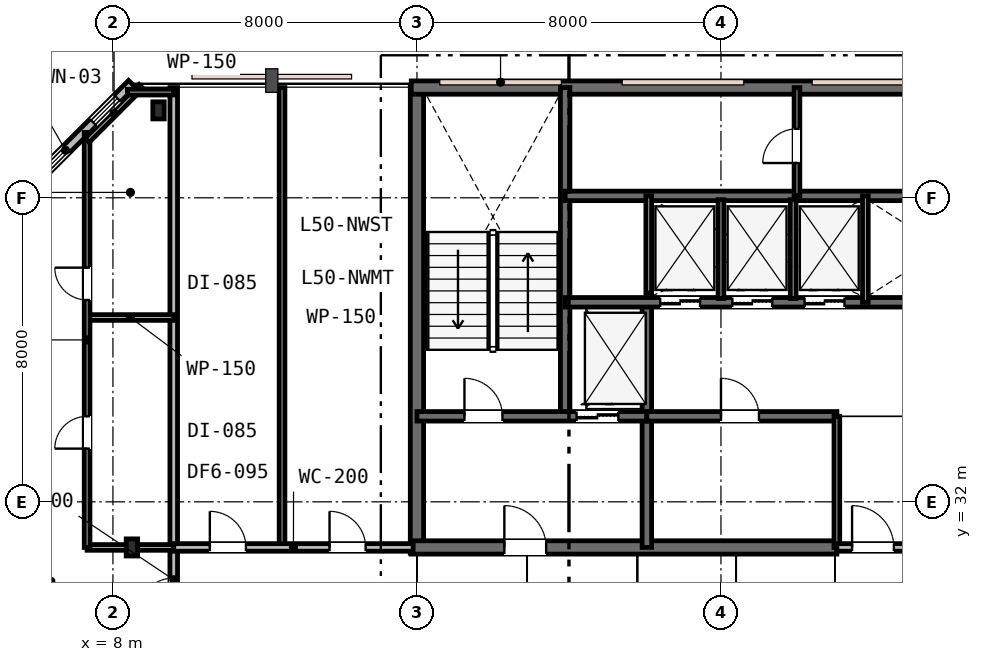
"""IFC4 building model, lengths in metres.
Left out: names, types, materials, properties, quantities, classifications, styles, units other than length and angle.
Written with IfcOpenShell. Run it as: python <this file> out.ifc"""

import sys

from ifc_helpers import new_model, si_unit, direction, frame, frame_2d, origin, origin_2d, place, context, subcontext, project, spatial, rectangle, i_section, extrude, element, fill, save


model = new_model("IFC4")
c1 = context("Model", 3, precision=1e-05, world=origin(), true_north=direction((0.0, 1.0)))
c2 = subcontext(c1, "Body", "Model", "MODEL_VIEW")
j1 = project(units=[si_unit("LENGTHUNIT", "METRE"), si_unit("PLANEANGLEUNIT", "RADIAN")], contexts=[c1])
p1 = place(None, origin())
s1 = spatial("IfcSite", under=j1, at=p1, CompositionType="ELEMENT")
p2 = place(p1, origin())
s2 = spatial("IfcBuilding", under=s1, at=p2, CompositionType="ELEMENT")
p3 = place(p2, frame((0.0, 0.0, 193.8)))
s3 = spatial("IfcBuildingStorey", under=s2, at=p3, CompositionType="ELEMENT", Elevation=193.8)
p4 = place(p3, frame((16.0, 30.65, 0.0), z_axis=(0.0, 0.0, 1.0), x_axis=(0.0, 1.0, 0.0)))
e1 = element("IfcWall", 1, at=p4, inside=s3, PredefinedType="SHEAR", context=c2, shape_type="SweptSolid", body=[
    extrude(rectangle(XDim=12.3, YDim=0.35, at=frame_2d((6.15, 0.0))), origin(), (0.0, 0.0, 1.0), 3.6),
])
p5 = place(p3, frame((15.85, 42.9, 0.0), z_axis=(0.0, 0.0, 1.0), x_axis=(1.0, 0.0, 0.0)))
e2 = element("IfcWall", 2, at=p5, inside=s3, PredefinedType="SHEAR", context=c2, shape_type="SweptSolid", body=[
    extrude(rectangle(XDim=24.3, YDim=0.35, at=frame_2d((12.15, 0.0))), origin(), (0.0, 0.0, 1.0), 3.6),
])
p6 = place(p3, frame((15.85, 30.8, 0.0), z_axis=(0.0, 0.0, 1.0), x_axis=(1.0, 0.0, 0.0)))
e3 = element("IfcWall", 3, at=p6, inside=s3, PredefinedType="SHEAR", context=c2, shape_type="SweptSolid", body=[
    extrude(rectangle(XDim=11.2, YDim=0.35, at=frame_2d((5.6, 0.0))), origin(), (0.0, 0.0, 1.0), 3.6),
])
p7 = place(p6, frame((2.45, 0.0, 0.0)))
e4 = element("IfcOpeningElement", 4, at=p7, cuts=e3, PredefinedType="OPENING", context=c2, shape_type="SweptSolid", body=[
    extrude(rectangle(XDim=1.1, YDim=2.15, at=frame_2d((0.55, 1.075))), frame((0.0, 0.185, 0.0), z_axis=(0.0, -1.0, 0.0), x_axis=(1.0, 0.0, 0.0)), (0.0, 0.0, 1.0), 0.37),
])
p8 = place(p3, frame((19.9, 34.25, 0.0), z_axis=(0.0, 0.0, 1.0), x_axis=(0.0, 1.0, 0.0)))
e5 = element("IfcWall", 5, at=p8, inside=s3, PredefinedType="SHEAR", context=c2, shape_type="SweptSolid", body=[
    extrude(rectangle(XDim=8.65, YDim=0.25, at=frame_2d((4.325, 0.0))), origin(), (0.0, 0.0, 1.0), 3.6),
])
p9 = place(p3, frame((22.05, 30.8, 0.0), z_axis=(0.0, 0.0, 1.0), x_axis=(0.0, 1.0, 0.0)))
e6 = element("IfcWall", 6, at=p9, inside=s3, PredefinedType="SHEAR", context=c2, shape_type="SweptSolid", body=[
    extrude(rectangle(XDim=6.45, YDim=0.25, at=frame_2d((3.225, 0.0))), origin(), (0.0, 0.0, 1.0), 3.6),
])
p10 = place(p3, frame((16.0, 34.25, 0.0), z_axis=(0.0, 0.0, 1.0), x_axis=(1.0, 0.0, 0.0)))
e7 = element("IfcWall", 7, at=p10, inside=s3, PredefinedType="SHEAR", context=c2, shape_type="SweptSolid", body=[
    extrude(rectangle(XDim=6.05, YDim=0.25, at=frame_2d((3.025, 0.0))), origin(), (0.0, 0.0, 1.0), 3.6),
])
p11 = place(p10, frame((1.25, 0.0, 0.0)))
e8 = element("IfcOpeningElement", 8, at=p11, cuts=e7, PredefinedType="OPENING", context=c2, shape_type="SweptSolid", body=[
    extrude(rectangle(XDim=1.0, YDim=2.15, at=frame_2d((0.5, 1.075))), frame((0.0, 0.135, 0.0), z_axis=(0.0, -1.0, 0.0), x_axis=(1.0, 0.0, 0.0)), (0.0, 0.0, 1.0), 0.27),
])
p12 = place(p10, frame((4.2, 0.0, 0.0)))
e9 = element("IfcOpeningElement", 9, at=p12, cuts=e7, PredefinedType="OPENING", context=c2, shape_type="SweptSolid", body=[
    extrude(rectangle(XDim=1.1, YDim=2.15, at=frame_2d((0.55, 1.075))), frame((0.0, 0.135, 0.0), z_axis=(0.0, -1.0, 0.0), x_axis=(1.0, 0.0, 0.0)), (0.0, 0.0, 1.0), 0.27),
])
p13 = place(p3, frame((22.05, 34.25, 0.0), z_axis=(0.0, 0.0, 1.0), x_axis=(1.0, 0.0, 0.0)))
e10 = element("IfcWall", 10, at=p13, inside=s3, PredefinedType="SHEAR", context=c2, shape_type="SweptSolid", body=[
    extrude(rectangle(XDim=5.0, YDim=0.25, at=frame_2d((2.5, 0.0))), origin(), (0.0, 0.0, 1.0), 3.6),
])
p14 = place(p13, frame((1.95, 0.0, 0.0)))
e11 = element("IfcOpeningElement", 11, at=p14, cuts=e10, PredefinedType="OPENING", context=c2, shape_type="SweptSolid", body=[
    extrude(rectangle(XDim=1.0, YDim=2.15, at=frame_2d((0.5, 1.075))), frame((0.0, 0.135, 0.0), z_axis=(0.0, -1.0, 0.0), x_axis=(1.0, 0.0, 0.0)), (0.0, 0.0, 1.0), 0.27),
])
p15 = place(p3, frame((19.9, 37.25, 0.0), z_axis=(0.0, 0.0, 1.0), x_axis=(1.0, 0.0, 0.0)))
e12 = element("IfcWall", 12, at=p15, inside=s3, PredefinedType="SHEAR", context=c2, shape_type="SweptSolid", body=[
    extrude(rectangle(XDim=16.2, YDim=0.25, at=frame_2d((8.1, 0.0))), origin(), (0.0, 0.0, 1.0), 3.6),
])
p16 = place(p15, frame((12.55, 0.0, 0.0)))
e13 = element("IfcOpeningElement", 13, at=p16, cuts=e12, PredefinedType="OPENING", context=c2, shape_type="SweptSolid", body=[
    extrude(rectangle(XDim=0.9, YDim=2.15, at=frame_2d((0.45, 1.075))), frame((0.0, 0.135, 0.0), z_axis=(0.0, -1.0, 0.0), x_axis=(1.0, 0.0, 0.0)), (0.0, 0.0, 1.0), 0.27),
])
p17 = place(p15, frame((2.5, 0.0, 0.0)))
e14 = element("IfcOpeningElement", 14, at=p17, cuts=e12, PredefinedType="OPENING", context=c2, shape_type="SweptSolid", body=[
    extrude(rectangle(XDim=1.05, YDim=2.15, at=frame_2d((0.525, 1.075))), frame((0.0, 0.135, 0.0), z_axis=(0.0, -1.0, 0.0), x_axis=(1.0, 0.0, 0.0)), (0.0, 0.0, 1.0), 0.27),
])
p18 = place(p15, frame((4.4, 0.0, 0.0)))
e15 = element("IfcOpeningElement", 15, at=p18, cuts=e12, PredefinedType="OPENING", context=c2, shape_type="SweptSolid", body=[
    extrude(rectangle(XDim=1.05, YDim=2.15, at=frame_2d((0.525, 1.075))), frame((0.0, 0.135, 0.0), z_axis=(0.0, -1.0, 0.0), x_axis=(1.0, 0.0, 0.0)), (0.0, 0.0, 1.0), 0.27),
])
p19 = place(p15, frame((6.3, 0.0, 0.0)))
e16 = element("IfcOpeningElement", 16, at=p19, cuts=e12, PredefinedType="OPENING", context=c2, shape_type="SweptSolid", body=[
    extrude(rectangle(XDim=1.05, YDim=2.15, at=frame_2d((0.525, 1.075))), frame((0.0, 0.135, 0.0), z_axis=(0.0, -1.0, 0.0), x_axis=(1.0, 0.0, 0.0)), (0.0, 0.0, 1.0), 0.27),
])
p20 = place(p3, frame((19.9, 40.05, 0.0), z_axis=(0.0, 0.0, 1.0), x_axis=(1.0, 0.0, 0.0)))
e17 = element("IfcWall", 17, at=p20, inside=s3, PredefinedType="SHEAR", context=c2, shape_type="SweptSolid", body=[
    extrude(rectangle(XDim=12.05, YDim=0.25, at=frame_2d((6.025, 0.0))), origin(), (0.0, 0.0, 1.0), 3.6),
])
for number, where, z_axis, x_axis in (
    (18, (8.5, 30.8, 0.0), (0.0, 0.0, 1.0), (1.0, 0.0, 0.0)),
    (19, (9.2, 42.3, 0.0), (0.0, 0.0, 1.0), (1.0, 0.0, 0.0)),
):
    element("IfcColumn", number, at=place(p3, frame(where, z_axis=z_axis, x_axis=x_axis)), inside=s3, PredefinedType="COLUMN", context=c2, shape_type="SweptSolid", body=[
        extrude(i_section(OverallWidth=0.3, OverallDepth=0.45, WebThickness=0.014, FlangeThickness=0.026, FilletRadius=0.027, at=origin_2d()), origin(), (0.0, 0.0, 1.0), 3.6),
    ])
p21 = place(p3, frame((8.5, 43.0, 0.0), z_axis=(0.0, 0.0, 1.0), x_axis=(-0.707106781187, -0.707106781187, 0.0)))
e20 = element("IfcWall", 20, at=p21, inside=s3, PredefinedType="STANDARD", context=c2, shape_type="SweptSolid", body=[
    extrude(rectangle(XDim=4.95, YDim=0.25, at=frame_2d((2.475, 0.0))), origin(), (0.0, 0.0, 1.0), 3.33),
])
p22 = place(p21, frame((0.54, 0.0, 0.9)))
e21 = element("IfcOpeningElement", 21, at=p22, cuts=e20, PredefinedType="OPENING", context=c2, shape_type="SweptSolid", body=[
    extrude(rectangle(XDim=0.9, YDim=1.55, at=frame_2d((0.45, 0.775))), frame((0.0, 0.135, 0.0), z_axis=(0.0, -1.0, 0.0), x_axis=(1.0, 0.0, 0.0)), (0.0, 0.0, 1.0), 0.27),
])
p23 = place(p21, frame((2.435, 0.0, 0.75)))
e22 = element("IfcOpeningElement", 22, at=p23, cuts=e20, PredefinedType="OPENING", context=c2, shape_type="SweptSolid", body=[
    extrude(rectangle(XDim=1.8, YDim=1.85, at=frame_2d((0.9, 0.925))), frame((0.0, 0.135, 0.0), z_axis=(0.0, -1.0, 0.0), x_axis=(1.0, 0.0, 0.0)), (0.0, 0.0, 1.0), 0.27),
])
p24 = place(p3, frame((27.05, 30.8, 0.0), z_axis=(0.0, 0.0, 1.0), x_axis=(0.0, 1.0, 0.0)))
e23 = element("IfcWall", 23, at=p24, inside=s3, PredefinedType="PLUMBINGWALL", context=c2, shape_type="SweptSolid", body=[
    extrude(rectangle(XDim=3.45, YDim=0.15, at=frame_2d((1.725, 0.0))), origin(), (0.0, 0.0, 1.0), 3.07),
])
p25 = place(p3, frame((27.05, 30.8, 0.0), z_axis=(0.0, 0.0, 1.0), x_axis=(1.0, 0.0, 0.0)))
e24 = element("IfcWall", 24, at=p25, inside=s3, PredefinedType="PARTITIONING", context=c2, shape_type="SweptSolid", body=[
    extrude(rectangle(XDim=1.9, YDim=0.2, at=frame_2d((0.95, 0.0))), origin(), (0.0, 0.0, 1.0), 3.07),
])
p26 = place(p25, frame((0.4, 0.0, 0.0)))
e25 = element("IfcOpeningElement", 25, at=p26, cuts=e24, PredefinedType="OPENING", context=c2, shape_type="SweptSolid", body=[
    extrude(rectangle(XDim=1.1, YDim=2.15, at=frame_2d((0.55, 1.075))), frame((0.0, 0.11, 0.0), z_axis=(0.0, -1.0, 0.0), x_axis=(1.0, 0.0, 0.0)), (0.0, 0.0, 1.0), 0.22),
])
p27 = place(p3, frame((22.1, 37.49, 0.0), z_axis=(0.0, 0.0, 1.0), x_axis=(0.0, 1.0, 0.0)))
e26 = element("IfcWall", 26, at=p27, inside=s3, PredefinedType="PLUMBINGWALL", context=c2, shape_type="SweptSolid", body=[
    extrude(rectangle(XDim=2.56, YDim=0.15, at=frame_2d((1.28, 0.0))), origin(), (0.0, 0.0, 1.0), 3.33),
])
p28 = place(p3, frame((27.8, 37.25, 0.0), z_axis=(0.0, 0.0, 1.0), x_axis=(0.0, 1.0, 0.0)))
e27 = element("IfcWall", 27, at=p28, inside=s3, PredefinedType="PLUMBINGWALL", context=c2, shape_type="SweptSolid", body=[
    extrude(rectangle(XDim=2.8, YDim=0.15, at=frame_2d((1.4, 0.0))), origin(), (0.0, 0.0, 1.0), 3.33),
])
for number, where, z_axis, x_axis in (
    (28, (24.0, 37.35, 0.0), (0.0, 0.0, 1.0), (0.0, 1.0, 0.0)),
    (29, (25.9, 37.35, 0.0), (0.0, 0.0, 1.0), (0.0, 1.0, 0.0)),
):
    element("IfcWall", number, at=place(p3, frame(where, z_axis=z_axis, x_axis=x_axis)), inside=s3, PredefinedType="PLUMBINGWALL", context=c2, shape_type="SweptSolid", body=[
        extrude(rectangle(XDim=2.6, YDim=0.15, at=frame_2d((1.3, 0.0))), origin(), (0.0, 0.0, 1.0), 3.33),
    ])
p29 = place(p3, frame((26.0, 40.05, 0.0), z_axis=(0.0, 0.0, 1.0), x_axis=(0.0, 1.0, 0.0)))
e30 = element("IfcWall", 30, at=p29, inside=s3, PredefinedType="PARTITIONING", context=c2, shape_type="SweptSolid", body=[
    extrude(rectangle(XDim=2.85, YDim=0.15, at=frame_2d((1.425, 0.0))), origin(), (0.0, 0.0, 1.0), 3.33),
])
p30 = place(p29, frame((0.865, 0.0, 0.0)))
e31 = element("IfcOpeningElement", 31, at=p30, cuts=e30, PredefinedType="OPENING", context=c2, shape_type="SweptSolid", body=[
    extrude(rectangle(XDim=0.9, YDim=2.15, at=frame_2d((0.45, 1.075))), frame((0.0, 0.085, 0.0), z_axis=(0.0, -1.0, 0.0), x_axis=(1.0, 0.0, 0.0)), (0.0, 0.0, 1.0), 0.17),
])
p31 = place(p3, frame((9.6, 17.0, 0.0), z_axis=(0.0, 0.0, 1.0), x_axis=(0.0, 1.0, 0.0)))
e32 = element("IfcWall", 32, at=p31, inside=s3, PredefinedType="PARTITIONING", context=c2, shape_type="SweptSolid", body=[
    extrude(rectangle(XDim=25.9, YDim=0.2, at=frame_2d((12.95, 0.0))), origin(), (0.0, 0.0, 1.0), 2.92),
])
p32 = place(p31, frame((12.045, 0.0, 0.0)))
e33 = element("IfcOpeningElement", 33, at=p32, cuts=e32, PredefinedType="OPENING", context=c2, shape_type="SweptSolid", body=[
    extrude(rectangle(XDim=0.95, YDim=2.15, at=frame_2d((0.475, 1.075))), frame((0.0, 0.11, 0.0), z_axis=(0.0, -1.0, 0.0), x_axis=(1.0, 0.0, 0.0)), (0.0, 0.0, 1.0), 0.22),
])
p33 = place(p31, frame((3.125, 0.0, 0.0)))
e34 = element("IfcOpeningElement", 34, at=p33, cuts=e32, PredefinedType="OPENING", context=c2, shape_type="SweptSolid", body=[
    extrude(rectangle(XDim=0.95, YDim=2.15, at=frame_2d((0.475, 1.075))), frame((0.0, 0.11, 0.0), z_axis=(0.0, -1.0, 0.0), x_axis=(1.0, 0.0, 0.0)), (0.0, 0.0, 1.0), 0.22),
])
p34 = place(p3, frame((7.32, 30.8, 0.0), z_axis=(0.0, 0.0, 1.0), x_axis=(1.0, 0.0, 0.0)))
e35 = element("IfcWall", 35, at=p34, inside=s3, PredefinedType="PARTITIONING", context=c2, shape_type="SweptSolid", body=[
    extrude(rectangle(XDim=2.28, YDim=0.15, at=frame_2d((1.14, 0.0))), origin(), (0.0, 0.0, 1.0), 2.92),
])
p35 = place(p3, frame((7.32, 36.85, 0.0), z_axis=(0.0, 0.0, 1.0), x_axis=(1.0, 0.0, 0.0)))
e36 = element("IfcWall", 36, at=p35, inside=s3, PredefinedType="PARTITIONING", context=c2, shape_type="SweptSolid", body=[
    extrude(rectangle(XDim=2.28, YDim=0.15, at=frame_2d((1.14, 0.0))), origin(), (0.0, 0.0, 1.0), 3.33),
])
p36 = place(p3, frame((7.32, 30.8, 0.0), z_axis=(0.0, 0.0, 1.0), x_axis=(0.0, 1.0, 0.0)))
e37 = element("IfcWall", 37, at=p36, inside=s3, PredefinedType="PARTITIONING", context=c2, shape_type="SweptSolid", body=[
    extrude(rectangle(XDim=10.92, YDim=0.15, at=frame_2d((5.46, 0.0))), origin(), (0.0, 0.0, 1.0), 2.92),
])
p37 = place(p36, frame((2.6, 0.0, 0.0)))
e38 = element("IfcOpeningElement", 38, at=p37, cuts=e37, PredefinedType="OPENING", context=c2, shape_type="SweptSolid", body=[
    extrude(rectangle(XDim=0.85, YDim=2.15, at=frame_2d((0.425, 1.075))), frame((0.0, 0.085, 0.0), z_axis=(0.0, -1.0, 0.0), x_axis=(1.0, 0.0, 0.0)), (0.0, 0.0, 1.0), 0.17),
])
p38 = place(p36, frame((6.512, 0.0, 0.0)))
e39 = element("IfcOpeningElement", 39, at=p38, cuts=e37, PredefinedType="OPENING", context=c2, shape_type="SweptSolid", body=[
    extrude(rectangle(XDim=0.85, YDim=2.15, at=frame_2d((0.425, 1.075))), frame((0.0, 0.085, 0.0), z_axis=(0.0, -1.0, 0.0), x_axis=(1.0, 0.0, 0.0)), (0.0, 0.0, 1.0), 0.17),
])
p39 = place(p3, frame((7.32, 41.509, 0.0), z_axis=(0.0, 0.0, 1.0), x_axis=(0.707106781187, 0.707106781187, 0.0)))
e40 = element("IfcWall", 40, at=p39, inside=s3, PredefinedType="PARTITIONING", context=c2, shape_type="SweptSolid", body=[
    extrude(rectangle(XDim=2.009, YDim=0.15, at=frame_2d((1.004, 0.0))), origin(), (0.0, 0.0, 1.0), 3.33),
])
p40 = place(p3, frame((8.38, 42.78, 0.0), z_axis=(0.0, 0.0, 1.0), x_axis=(1.0, 0.0, 0.0)))
e41 = element("IfcWall", 41, at=p40, inside=s3, PredefinedType="PARTITIONING", context=c2, shape_type="SweptSolid", body=[
    extrude(rectangle(XDim=1.22, YDim=0.15, at=frame_2d((0.61, 0.0))), origin(), (0.0, 0.0, 1.0), 3.02),
])
p41 = place(p3, frame((12.45, 30.8, 0.0), z_axis=(0.0, 0.0, 1.0), x_axis=(0.0, 1.0, 0.0)))
e42 = element("IfcWall", 42, at=p41, inside=s3, PredefinedType="PARTITIONING", context=c2, shape_type="SweptSolid", body=[
    extrude(rectangle(XDim=12.1, YDim=0.15, at=frame_2d((6.05, 0.0))), origin(), (0.0, 0.0, 1.0), 2.92),
])
p42 = place(p3, frame((9.6, 30.8, 0.0), z_axis=(0.0, 0.0, 1.0), x_axis=(1.0, 0.0, 0.0)))
e43 = element("IfcWall", 43, at=p42, inside=s3, PredefinedType="PARTITIONING", context=c2, shape_type="SweptSolid", body=[
    extrude(rectangle(XDim=6.3, YDim=0.2, at=frame_2d((3.15, 0.0))), origin(), (0.0, 0.0, 1.0), 2.92),
])
p43 = place(p42, frame((0.95, 0.0, 0.0)))
e44 = element("IfcOpeningElement", 44, at=p43, cuts=e43, PredefinedType="OPENING", context=c2, shape_type="SweptSolid", body=[
    extrude(rectangle(XDim=0.95, YDim=2.15, at=frame_2d((0.475, 1.075))), frame((0.0, 0.11, 0.0), z_axis=(0.0, -1.0, 0.0), x_axis=(1.0, 0.0, 0.0)), (0.0, 0.0, 1.0), 0.22),
])
p44 = place(p42, frame((4.1, 0.0, 0.0)))
e45 = element("IfcOpeningElement", 45, at=p44, cuts=e43, PredefinedType="OPENING", context=c2, shape_type="SweptSolid", body=[
    extrude(rectangle(XDim=0.95, YDim=2.15, at=frame_2d((0.475, 1.075))), frame((0.0, 0.11, 0.0), z_axis=(0.0, -1.0, 0.0), x_axis=(1.0, 0.0, 0.0)), (0.0, 0.0, 1.0), 0.22),
])
p45 = place(p22, origin())
e46 = element("IfcWindow", 46, at=p45, inside=s3, PartitioningType="SINGLE_PANEL", PredefinedType="WINDOW", context=c2, shape_type="SweptSolid", body=[
    extrude(rectangle(XDim=0.9, YDim=1.55, at=frame_2d((0.45, 0.775))), frame((0.0, 0.03, 0.0), z_axis=(0.0, -1.0, 0.0), x_axis=(1.0, 0.0, 0.0)), (0.0, 0.0, 1.0), 0.06),
])
fill(e21, e46)
p46 = place(p23, origin())
e47 = element("IfcWindow", 47, at=p46, inside=s3, PartitioningType="SINGLE_PANEL", PredefinedType="WINDOW", context=c2, shape_type="SweptSolid", body=[
    extrude(rectangle(XDim=1.8, YDim=1.85, at=frame_2d((0.9, 0.925))), frame((0.0, 0.03, 0.0), z_axis=(0.0, -1.0, 0.0), x_axis=(1.0, 0.0, 0.0)), (0.0, 0.0, 1.0), 0.06),
])
fill(e22, e47)
p47 = place(p26, origin())
e48 = element("IfcDoor", 48, at=p47, inside=s3, OperationType="SINGLE_SWING_LEFT", PredefinedType="DOOR", context=c2, shape_type="SweptSolid", body=[
    extrude(rectangle(XDim=1.1, YDim=2.15, at=frame_2d((0.55, 1.075))), frame((0.0, 0.025, 0.0), z_axis=(0.0, -1.0, 0.0), x_axis=(1.0, 0.0, 0.0)), (0.0, 0.0, 1.0), 0.05),
])
fill(e25, e48)
p48 = place(p11, origin())
e49 = element("IfcDoor", 49, at=p48, inside=s3, OperationType="SINGLE_SWING_LEFT", PredefinedType="DOOR", context=c2, shape_type="SweptSolid", body=[
    extrude(rectangle(XDim=1.0, YDim=2.15, at=frame_2d((0.5, 1.075))), frame((0.0, 0.025, 0.0), z_axis=(0.0, -1.0, 0.0), x_axis=(1.0, 0.0, 0.0)), (0.0, 0.0, 1.0), 0.05),
])
fill(e8, e49)
p49 = place(p7, origin())
e50 = element("IfcDoor", 50, at=p49, inside=s3, OperationType="SINGLE_SWING_LEFT", PredefinedType="DOOR", context=c2, shape_type="SweptSolid", body=[
    extrude(rectangle(XDim=1.1, YDim=2.15, at=frame_2d((0.55, 1.075))), frame((0.0, 0.025, 0.0), z_axis=(0.0, -1.0, 0.0), x_axis=(1.0, 0.0, 0.0)), (0.0, 0.0, 1.0), 0.05),
])
fill(e4, e50)
p50 = place(p14, origin())
e51 = element("IfcDoor", 51, at=p50, inside=s3, OperationType="SINGLE_SWING_LEFT", PredefinedType="DOOR", context=c2, shape_type="SweptSolid", body=[
    extrude(rectangle(XDim=1.0, YDim=2.15, at=frame_2d((0.5, 1.075))), frame((0.0, 0.025, 0.0), z_axis=(0.0, -1.0, 0.0), x_axis=(1.0, 0.0, 0.0)), (0.0, 0.0, 1.0), 0.05),
])
fill(e11, e51)
p51 = place(p30, origin())
e52 = element("IfcDoor", 52, at=p51, inside=s3, OperationType="SINGLE_SWING_LEFT", PredefinedType="DOOR", context=c2, shape_type="SweptSolid", body=[
    extrude(rectangle(XDim=0.9, YDim=2.15, at=frame_2d((0.45, 1.075))), frame((0.0, 0.025, 0.0), z_axis=(0.0, -1.0, 0.0), x_axis=(1.0, 0.0, 0.0)), (0.0, 0.0, 1.0), 0.05),
])
fill(e31, e52)
p52 = place(p32, origin())
e53 = element("IfcDoor", 53, at=p52, inside=s3, OperationType="SINGLE_SWING_LEFT", PredefinedType="DOOR", context=c2, shape_type="SweptSolid", body=[
    extrude(rectangle(XDim=0.95, YDim=2.15, at=frame_2d((0.475, 1.075))), frame((0.0, 0.025, 0.0), z_axis=(0.0, -1.0, 0.0), x_axis=(1.0, 0.0, 0.0)), (0.0, 0.0, 1.0), 0.05),
])
fill(e33, e53)
p53 = place(p37, origin())
e54 = element("IfcDoor", 54, at=p53, inside=s3, OperationType="SINGLE_SWING_LEFT", PredefinedType="DOOR", context=c2, shape_type="SweptSolid", body=[
    extrude(rectangle(XDim=0.85, YDim=2.15, at=frame_2d((0.425, 1.075))), frame((0.0, 0.025, 0.0), z_axis=(0.0, -1.0, 0.0), x_axis=(1.0, 0.0, 0.0)), (0.0, 0.0, 1.0), 0.05),
])
fill(e38, e54)
p54 = place(p38, origin())
e55 = element("IfcDoor", 55, at=p54, inside=s3, OperationType="SINGLE_SWING_RIGHT", PredefinedType="DOOR", context=c2, shape_type="SweptSolid", body=[
    extrude(rectangle(XDim=0.85, YDim=2.15, at=frame_2d((0.425, 1.075))), frame((0.0, 0.025, 0.0), z_axis=(0.0, -1.0, 0.0), x_axis=(1.0, 0.0, 0.0)), (0.0, 0.0, 1.0), 0.05),
])
fill(e39, e55)
p55 = place(p43, origin())
e56 = element("IfcDoor", 56, at=p55, inside=s3, OperationType="SINGLE_SWING_LEFT", PredefinedType="DOOR", context=c2, shape_type="SweptSolid", body=[
    extrude(rectangle(XDim=0.95, YDim=2.15, at=frame_2d((0.475, 1.075))), frame((0.0, 0.025, 0.0), z_axis=(0.0, -1.0, 0.0), x_axis=(1.0, 0.0, 0.0)), (0.0, 0.0, 1.0), 0.05),
])
fill(e44, e56)
p56 = place(p44, origin())
e57 = element("IfcDoor", 57, at=p56, inside=s3, OperationType="SINGLE_SWING_LEFT", PredefinedType="DOOR", context=c2, shape_type="SweptSolid", body=[
    extrude(rectangle(XDim=0.95, YDim=2.15, at=frame_2d((0.475, 1.075))), frame((0.0, 0.025, 0.0), z_axis=(0.0, -1.0, 0.0), x_axis=(1.0, 0.0, 0.0)), (0.0, 0.0, 1.0), 0.05),
])
fill(e45, e57)
p57 = place(p12, origin())
e58 = element("IfcDoor", 58, at=p57, inside=s3, OperationType="DOUBLE_DOOR_SLIDING", PredefinedType="DOOR", context=c2, shape_type="SweptSolid", body=[
    extrude(rectangle(XDim=1.1, YDim=2.15, at=frame_2d((0.55, 1.075))), frame((0.0, 0.025, 0.0), z_axis=(0.0, -1.0, 0.0), x_axis=(1.0, 0.0, 0.0)), (0.0, 0.0, 1.0), 0.05),
])
fill(e9, e58)
p58 = place(p17, origin())
e59 = element("IfcDoor", 59, at=p58, inside=s3, OperationType="DOUBLE_DOOR_SLIDING", PredefinedType="DOOR", context=c2, shape_type="SweptSolid", body=[
    extrude(rectangle(XDim=1.05, YDim=2.15, at=frame_2d((0.525, 1.075))), frame((0.0, 0.025, 0.0), z_axis=(0.0, -1.0, 0.0), x_axis=(1.0, 0.0, 0.0)), (0.0, 0.0, 1.0), 0.05),
])
fill(e14, e59)
p59 = place(p18, origin())
e60 = element("IfcDoor", 60, at=p59, inside=s3, OperationType="DOUBLE_DOOR_SLIDING", PredefinedType="DOOR", context=c2, shape_type="SweptSolid", body=[
    extrude(rectangle(XDim=1.05, YDim=2.15, at=frame_2d((0.525, 1.075))), frame((0.0, 0.025, 0.0), z_axis=(0.0, -1.0, 0.0), x_axis=(1.0, 0.0, 0.0)), (0.0, 0.0, 1.0), 0.05),
])
fill(e15, e60)
p60 = place(p19, origin())
e61 = element("IfcDoor", 61, at=p60, inside=s3, OperationType="DOUBLE_DOOR_SLIDING", PredefinedType="DOOR", context=c2, shape_type="SweptSolid", body=[
    extrude(rectangle(XDim=1.05, YDim=2.15, at=frame_2d((0.525, 1.075))), frame((0.0, 0.025, 0.0), z_axis=(0.0, -1.0, 0.0), x_axis=(1.0, 0.0, 0.0)), (0.0, 0.0, 1.0), 0.05),
])
fill(e16, e61)
save(model, sys.argv[1])
